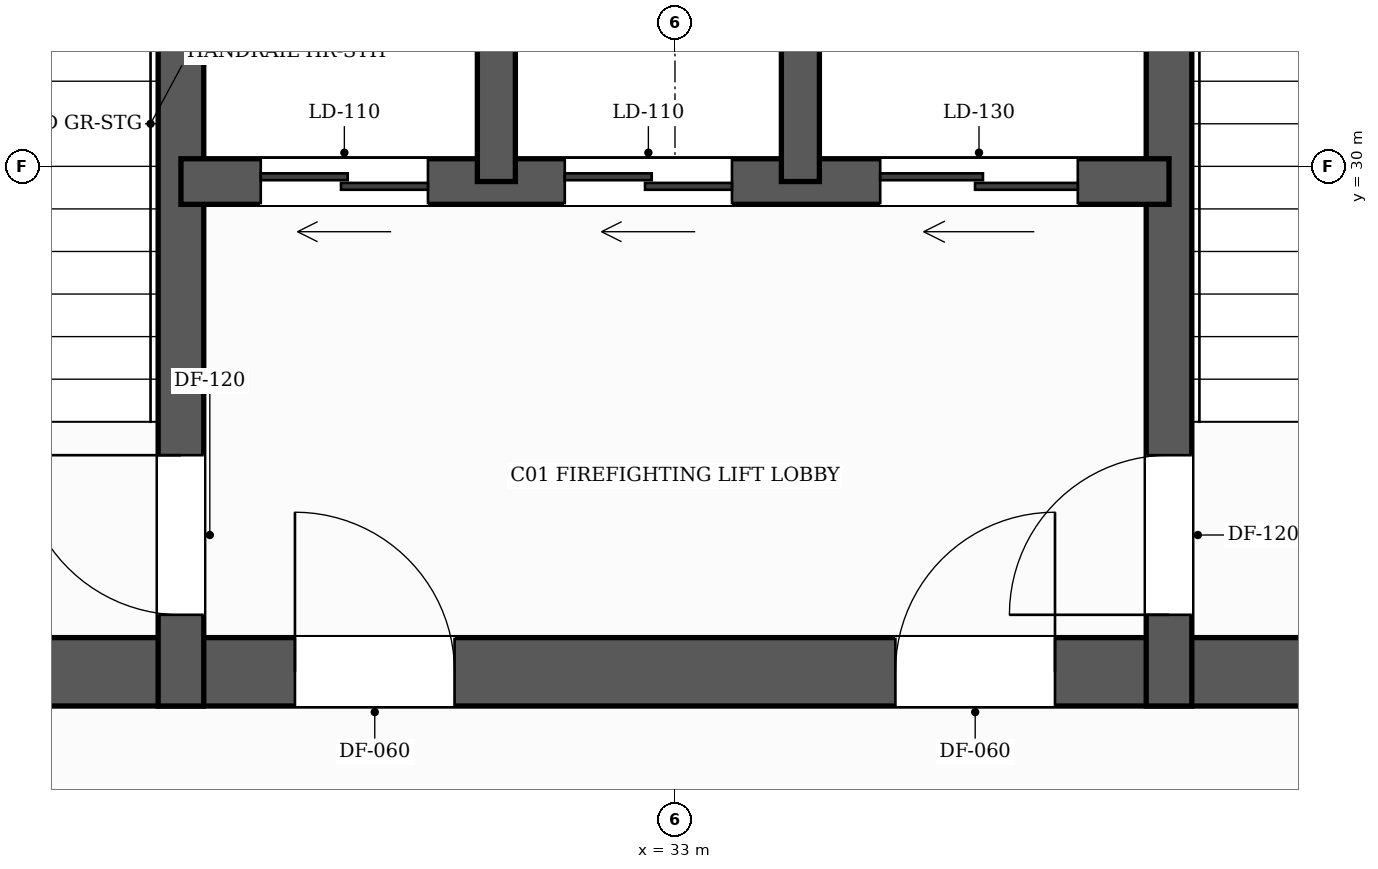
"""IFC4 building model, lengths in metres.
Left out: names, types, materials, properties, quantities, classifications, styles, units other than length and angle.
Written with IfcOpenShell. Run it as: python <this file> out.ifc"""

import sys

from ifc_helpers import new_model, si_unit, direction, frame, frame_2d, origin, place, context, subcontext, project, spatial, rectangle, extrude, element, fill, save


model = new_model("IFC4")
c1 = context("Model", 3, precision=1e-05, world=origin(), true_north=direction((0.0, 1.0)))
c2 = subcontext(c1, "Body", "Model", "MODEL_VIEW")
j1 = project(units=[si_unit("LENGTHUNIT", "METRE"), si_unit("PLANEANGLEUNIT", "RADIAN")], contexts=[c1])
p1 = place(None, origin())
s1 = spatial("IfcSite", under=j1, at=p1, CompositionType="ELEMENT")
p2 = place(p1, origin())
s2 = spatial("IfcBuilding", under=s1, at=p2, CompositionType="ELEMENT")
p3 = place(p2, origin())
s3 = spatial("IfcBuildingStorey", under=s2, at=p3, CompositionType="ELEMENT", Elevation=0.0)
p4 = place(p3, frame((26.15, 26.675, 0.0), z_axis=(0.0, 0.0, 1.0), x_axis=(1.0, 0.0, 0.0)))
e1 = element("IfcWall", 1, at=p4, inside=s3, PredefinedType="SHEAR", context=c2, shape_type="SweptSolid", body=[
    extrude(rectangle(XDim=13.7, YDim=0.45, at=frame_2d((6.85, 0.0))), origin(), (0.0, 0.0, 1.0), 5.5),
])
p5 = place(p4, frame((4.35, 0.0, 0.0)))
e2 = element("IfcOpeningElement", 2, at=p5, cuts=e1, PredefinedType="OPENING", context=c2, shape_type="SweptSolid", body=[
    extrude(rectangle(XDim=1.05, YDim=2.15, at=frame_2d((0.525, 1.075))), frame((0.0, 0.235, 0.0), z_axis=(0.0, -1.0, 0.0), x_axis=(1.0, 0.0, 0.0)), (0.0, 0.0, 1.0), 0.47),
])
p6 = place(p4, frame((8.3, 0.0, 0.0)))
e3 = element("IfcOpeningElement", 3, at=p6, cuts=e1, PredefinedType="OPENING", context=c2, shape_type="SweptSolid", body=[
    extrude(rectangle(XDim=1.05, YDim=2.15, at=frame_2d((0.525, 1.075))), frame((0.0, 0.235, 0.0), z_axis=(0.0, -1.0, 0.0), x_axis=(1.0, 0.0, 0.0)), (0.0, 0.0, 1.0), 0.47),
])
p7 = place(p3, frame((29.75, 26.45, 0.0), z_axis=(0.0, 0.0, 1.0), x_axis=(0.0, 1.0, 0.0)))
e4 = element("IfcWall", 4, at=p7, inside=s3, PredefinedType="SHEAR", context=c2, shape_type="SweptSolid", body=[
    extrude(rectangle(XDim=8.2, YDim=0.3, at=frame_2d((4.1, 0.0))), origin(), (0.0, 0.0, 1.0), 5.5),
])
p8 = place(p7, frame((0.6, 0.0, 0.0)))
e5 = element("IfcOpeningElement", 5, at=p8, cuts=e4, PredefinedType="OPENING", context=c2, shape_type="SweptSolid", body=[
    extrude(rectangle(XDim=1.05, YDim=2.15, at=frame_2d((0.525, 1.075))), frame((0.0, 0.16, 0.0), z_axis=(0.0, -1.0, 0.0), x_axis=(1.0, 0.0, 0.0)), (0.0, 0.0, 1.0), 0.32),
])
p9 = place(p3, frame((36.25, 26.45, 0.0), z_axis=(0.0, 0.0, 1.0), x_axis=(0.0, 1.0, 0.0)))
e6 = element("IfcWall", 6, at=p9, inside=s3, PredefinedType="SHEAR", context=c2, shape_type="SweptSolid", body=[
    extrude(rectangle(XDim=8.2, YDim=0.3, at=frame_2d((4.1, 0.0))), origin(), (0.0, 0.0, 1.0), 5.5),
])
p10 = place(p9, frame((0.6, 0.0, 0.0)))
e7 = element("IfcOpeningElement", 7, at=p10, cuts=e6, PredefinedType="OPENING", context=c2, shape_type="SweptSolid", body=[
    extrude(rectangle(XDim=1.05, YDim=2.15, at=frame_2d((0.525, 1.075))), frame((0.0, 0.16, 0.0), z_axis=(0.0, -1.0, 0.0), x_axis=(1.0, 0.0, 0.0)), (0.0, 0.0, 1.0), 0.32),
])
p11 = place(p3, frame((36.25, 29.9, 0.0), z_axis=(0.0, 0.0, 1.0), x_axis=(-1.0, 0.0, 0.0)))
e8 = element("IfcWall", 8, at=p11, inside=s3, PredefinedType="SHEAR", context=c2, shape_type="SweptSolid", body=[
    extrude(rectangle(XDim=6.5, YDim=0.3, at=frame_2d((3.25, 0.0))), origin(), (0.0, 0.0, 1.0), 5.5),
])
p12 = place(p11, frame((4.875, 0.0, 0.0)))
e9 = element("IfcOpeningElement", 9, at=p12, cuts=e8, PredefinedType="OPENING", context=c2, shape_type="SweptSolid", body=[
    extrude(rectangle(XDim=1.1, YDim=2.2, at=frame_2d((0.55, 1.1))), frame((0.0, 0.16, 0.0), z_axis=(0.0, -1.0, 0.0), x_axis=(1.0, 0.0, 0.0)), (0.0, 0.0, 1.0), 0.32),
])
p13 = place(p11, frame((2.875, 0.0, 0.0)))
e10 = element("IfcOpeningElement", 10, at=p13, cuts=e8, PredefinedType="OPENING", context=c2, shape_type="SweptSolid", body=[
    extrude(rectangle(XDim=1.1, YDim=2.2, at=frame_2d((0.55, 1.1))), frame((0.0, 0.16, 0.0), z_axis=(0.0, -1.0, 0.0), x_axis=(1.0, 0.0, 0.0)), (0.0, 0.0, 1.0), 0.32),
])
p14 = place(p11, frame((0.6, 0.0, 0.0)))
e11 = element("IfcOpeningElement", 11, at=p14, cuts=e8, PredefinedType="OPENING", context=c2, shape_type="SweptSolid", body=[
    extrude(rectangle(XDim=1.3, YDim=2.2, at=frame_2d((0.65, 1.1))), frame((0.0, 0.16, 0.0), z_axis=(0.0, -1.0, 0.0), x_axis=(1.0, 0.0, 0.0)), (0.0, 0.0, 1.0), 0.32),
])
for number, where, z_axis, x_axis in (
    (12, (31.825, 29.9, 0.0), (0.0, 0.0, 1.0), (0.0, 1.0, 0.0)),
    (13, (33.825, 29.9, 0.0), (0.0, 0.0, 1.0), (0.0, 1.0, 0.0)),
):
    element("IfcWall", number, at=place(p3, frame(where, z_axis=z_axis, x_axis=x_axis)), inside=s3, PredefinedType="SHEAR", context=c2, shape_type="SweptSolid", body=[
        extrude(rectangle(XDim=2.9, YDim=0.25, at=frame_2d((1.45, 0.0))), origin(), (0.0, 0.0, 1.0), 5.5),
    ])
p15 = place(p8, origin())
e14 = element("IfcDoor", 14, at=p15, inside=s3, OperationType="SINGLE_SWING_RIGHT", PredefinedType="DOOR", context=c2, shape_type="SweptSolid", body=[
    extrude(rectangle(XDim=1.05, YDim=2.15, at=frame_2d((0.525, 1.075))), frame((0.0, 0.025, 0.0), z_axis=(0.0, -1.0, 0.0), x_axis=(1.0, 0.0, 0.0)), (0.0, 0.0, 1.0), 0.05),
])
fill(e5, e14)
p16 = place(p10, origin())
e15 = element("IfcDoor", 15, at=p16, inside=s3, OperationType="SINGLE_SWING_LEFT", PredefinedType="DOOR", context=c2, shape_type="SweptSolid", body=[
    extrude(rectangle(XDim=1.05, YDim=2.15, at=frame_2d((0.525, 1.075))), frame((0.0, 0.025, 0.0), z_axis=(0.0, -1.0, 0.0), x_axis=(1.0, 0.0, 0.0)), (0.0, 0.0, 1.0), 0.05),
])
fill(e7, e15)
p17 = place(p5, origin())
e16 = element("IfcDoor", 16, at=p17, inside=s3, OperationType="SINGLE_SWING_LEFT", PredefinedType="DOOR", context=c2, shape_type="SweptSolid", body=[
    extrude(rectangle(XDim=1.05, YDim=2.15, at=frame_2d((0.525, 1.075))), frame((0.0, 0.025, 0.0), z_axis=(0.0, -1.0, 0.0), x_axis=(1.0, 0.0, 0.0)), (0.0, 0.0, 1.0), 0.05),
])
fill(e2, e16)
p18 = place(p6, origin())
e17 = element("IfcDoor", 17, at=p18, inside=s3, OperationType="SINGLE_SWING_RIGHT", PredefinedType="DOOR", context=c2, shape_type="SweptSolid", body=[
    extrude(rectangle(XDim=1.05, YDim=2.15, at=frame_2d((0.525, 1.075))), frame((0.0, 0.025, 0.0), z_axis=(0.0, -1.0, 0.0), x_axis=(1.0, 0.0, 0.0)), (0.0, 0.0, 1.0), 0.05),
])
fill(e3, e17)
p19 = place(p12, origin())
e18 = element("IfcDoor", 18, at=p19, inside=s3, OperationType="DOUBLE_DOOR_SLIDING", PredefinedType="DOOR", context=c2, shape_type="SweptSolid", body=[
    extrude(rectangle(XDim=1.1, YDim=2.2, at=frame_2d((0.55, 1.1))), frame((0.0, 0.025, 0.0), z_axis=(0.0, -1.0, 0.0), x_axis=(1.0, 0.0, 0.0)), (0.0, 0.0, 1.0), 0.05),
])
fill(e9, e18)
p20 = place(p13, origin())
e19 = element("IfcDoor", 19, at=p20, inside=s3, OperationType="DOUBLE_DOOR_SLIDING", PredefinedType="DOOR", context=c2, shape_type="SweptSolid", body=[
    extrude(rectangle(XDim=1.1, YDim=2.2, at=frame_2d((0.55, 1.1))), frame((0.0, 0.025, 0.0), z_axis=(0.0, -1.0, 0.0), x_axis=(1.0, 0.0, 0.0)), (0.0, 0.0, 1.0), 0.05),
])
fill(e10, e19)
p21 = place(p14, origin())
e20 = element("IfcDoor", 20, at=p21, inside=s3, OperationType="DOUBLE_DOOR_SLIDING", PredefinedType="DOOR", context=c2, shape_type="SweptSolid", body=[
    extrude(rectangle(XDim=1.3, YDim=2.2, at=frame_2d((0.65, 1.1))), frame((0.0, 0.025, 0.0), z_axis=(0.0, -1.0, 0.0), x_axis=(1.0, 0.0, 0.0)), (0.0, 0.0, 1.0), 0.05),
])
fill(e11, e20)
save(model, sys.argv[1])
